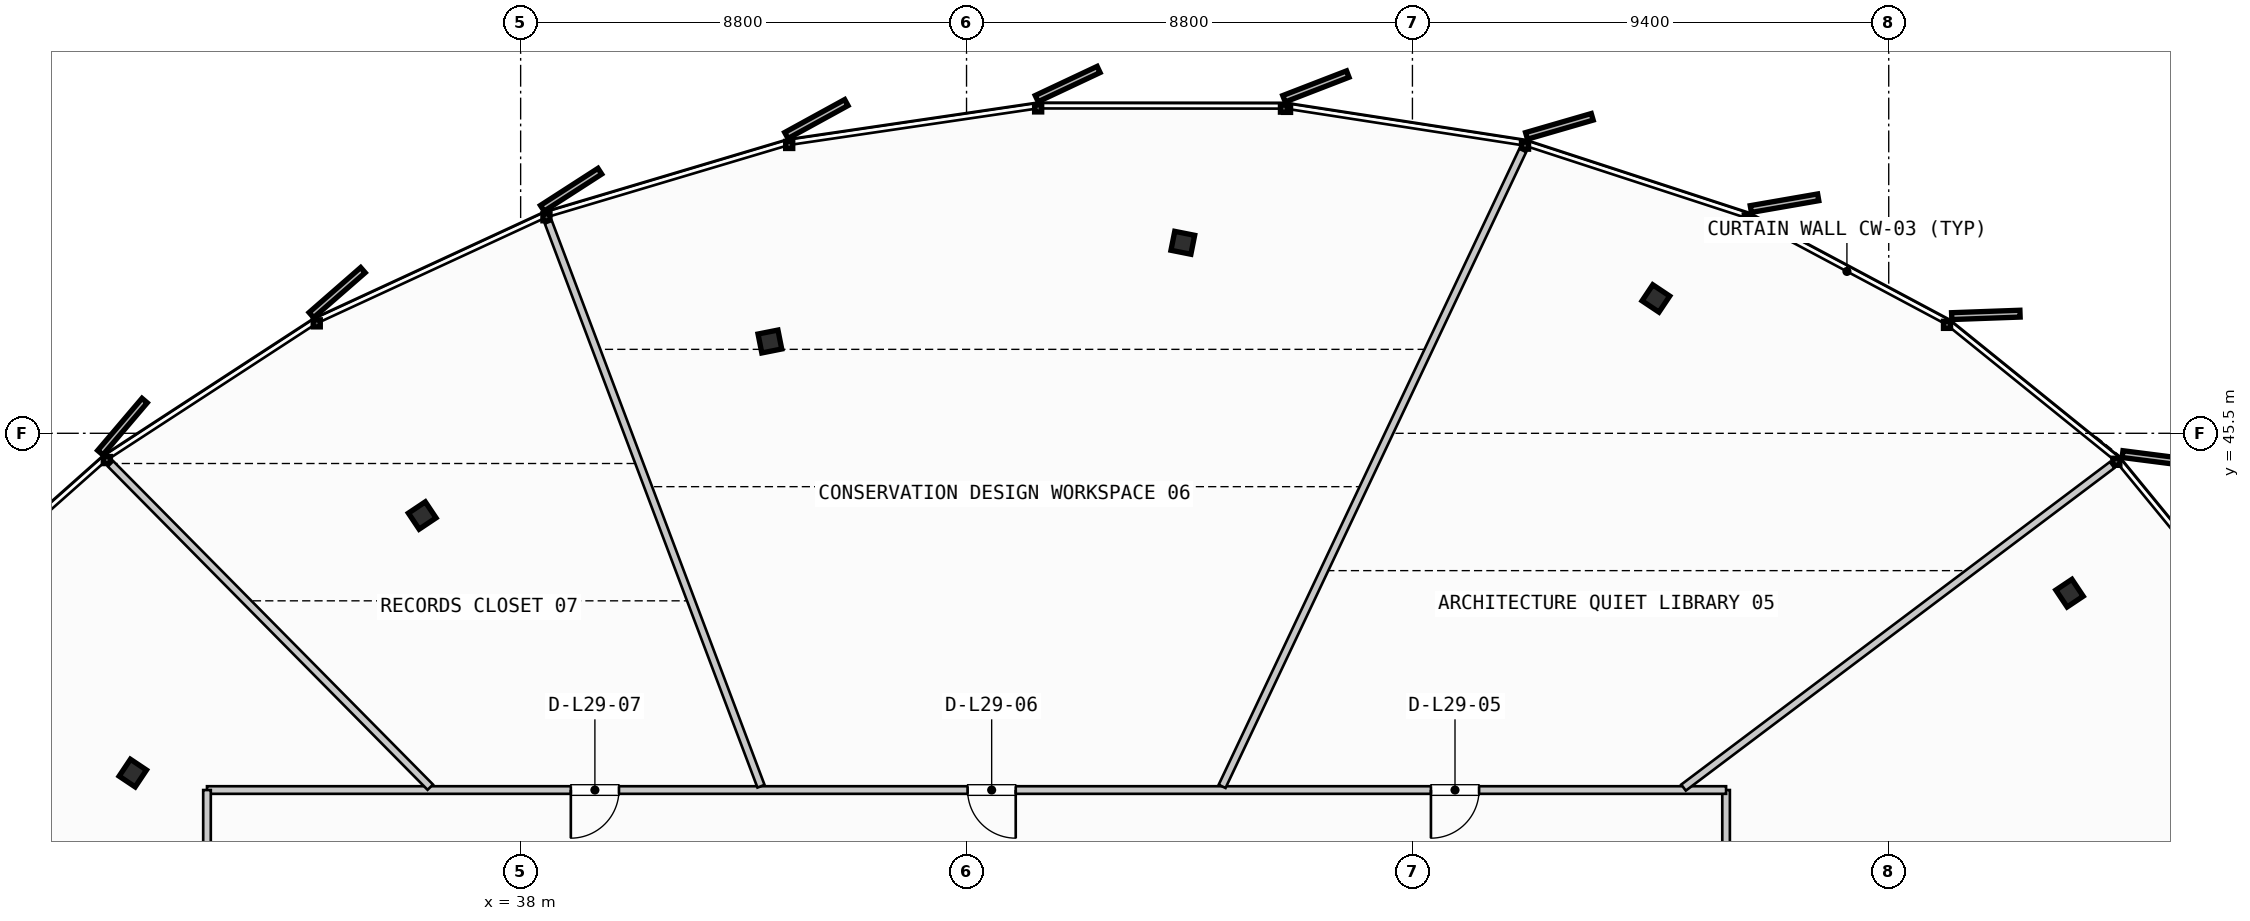
"""IFC4 building model, lengths in metres.
Left out: names, types, materials, properties, quantities, classifications, styles, units other than length and angle.
Written with IfcOpenShell. Run it as: python <this file> out.ifc"""

import sys

from ifc_helpers import new_model, si_unit, direction, frame, frame_2d, origin, origin_2d, place, context, subcontext, project, spatial, rectangle, i_section, extrude, source, transform, mapped, element, fill, save


model = new_model("IFC4")
c1 = context("Model", 3, precision=1e-05, world=origin(), true_north=direction((0.0, 1.0)))
c2 = subcontext(c1, "Body", "Model", "MODEL_VIEW")
j1 = project(units=[si_unit("LENGTHUNIT", "METRE"), si_unit("PLANEANGLEUNIT", "RADIAN")], contexts=[c1])
p1 = place(None, origin())
s1 = spatial("IfcSite", under=j1, at=p1, CompositionType="ELEMENT")
p2 = place(p1, origin())
s2 = spatial("IfcBuilding", under=s1, at=p2, CompositionType="ELEMENT")
p3 = place(p2, frame((0.0, 0.0, 118.0)))
s3 = spatial("IfcBuildingStorey", under=s2, at=p3, CompositionType="ELEMENT", Elevation=118.0)
m1 = source(origin(), c2, "Body", "SweptSolid", [
    extrude(i_section(OverallWidth=0.401, OverallDepth=0.381, WebThickness=0.032, FlangeThickness=0.051, FilletRadius=0.015, at=origin_2d()), origin(), (0.0, 0.0, 1.0), 3.35),
])
for number, where, z_axis, x_axis in (
    (1, (68.569, 42.345, 0.0), (0.0, 0.0, 1.0), (0.831, 0.556, 0.0)),
    (2, (60.405, 48.161, 0.0), (0.0, 0.0, 1.0), (0.556, 0.831, 0.0)),
    (3, (51.069, 49.259, 0.0), (0.0, 0.0, 1.0), (0.195, 0.981, 0.0)),
    (4, (42.919, 47.311, 0.0), (0.0, 0.0, 1.0), (-0.195, 0.981, 0.0)),
    (5, (36.058, 43.877, 0.0), (0.0, 0.0, 1.0), (-0.556, 0.831, 0.0)),
    (6, (30.346, 38.794, 0.0), (0.0, 0.0, 1.0), (-0.831, 0.556, 0.0)),
):
    element("IfcColumn", number, at=place(p3, frame(where, z_axis=z_axis, x_axis=x_axis)), inside=s3, PredefinedType="COLUMN", context=c2, shape_type="MappedRepresentation", body=[
        mapped(m1, transform((0.0, 0.0, 0.0), scale=1.0)),
    ])
p4 = place(p3, frame((61.79, 17.14, 0.0), z_axis=(0.0, 0.0, 1.0), x_axis=(0.0, 1.0, 0.0)))
e7 = element("IfcWall", 7, at=p4, inside=s3, PredefinedType="PARTITIONING", context=c2, shape_type="SweptSolid", body=[
    extrude(rectangle(XDim=21.32, YDim=0.15, at=frame_2d((10.66, 0.0))), origin(), (0.0, 0.0, 1.0), 2.775),
])
p5 = place(p4, frame((4.571, 0.0, 0.0)))
e8 = element("IfcOpeningElement", 8, at=p5, cuts=e7, PredefinedType="OPENING", context=c2, shape_type="SweptSolid", body=[
    extrude(rectangle(XDim=0.95, YDim=2.15, at=frame_2d((0.475, 1.075))), frame((0.0, 0.085, 0.0), z_axis=(0.0, -1.0, 0.0), x_axis=(1.0, 0.0, 0.0)), (0.0, 0.0, 1.0), 0.17),
])
p6 = place(p4, frame((14.65, 0.0, 0.0)))
e9 = element("IfcOpeningElement", 9, at=p6, cuts=e7, PredefinedType="OPENING", context=c2, shape_type="SweptSolid", body=[
    extrude(rectangle(XDim=0.95, YDim=2.15, at=frame_2d((0.475, 1.075))), frame((0.0, 0.085, 0.0), z_axis=(0.0, -1.0, 0.0), x_axis=(1.0, 0.0, 0.0)), (0.0, 0.0, 1.0), 0.17),
])
p7 = place(p3, frame((61.79, 38.46, 0.0), z_axis=(0.0, 0.0, 1.0), x_axis=(-1.0, 0.0, 0.0)))
e10 = element("IfcWall", 10, at=p7, inside=s3, PredefinedType="PARTITIONING", context=c2, shape_type="SweptSolid", body=[
    extrude(rectangle(XDim=29.98, YDim=0.15, at=frame_2d((14.99, 0.0))), origin(), (0.0, 0.0, 1.0), 2.775),
])
p8 = place(p7, frame((4.875, 0.0, 0.0)))
e11 = element("IfcOpeningElement", 11, at=p8, cuts=e10, PredefinedType="OPENING", context=c2, shape_type="SweptSolid", body=[
    extrude(rectangle(XDim=0.95, YDim=2.15, at=frame_2d((0.475, 1.075))), frame((0.0, 0.085, 0.0), z_axis=(0.0, -1.0, 0.0), x_axis=(1.0, 0.0, 0.0)), (0.0, 0.0, 1.0), 0.17),
])
p9 = place(p7, frame((14.019, 0.0, 0.0)))
e12 = element("IfcOpeningElement", 12, at=p9, cuts=e10, PredefinedType="OPENING", context=c2, shape_type="SweptSolid", body=[
    extrude(rectangle(XDim=0.95, YDim=2.15, at=frame_2d((0.475, 1.075))), frame((0.0, 0.085, 0.0), z_axis=(0.0, -1.0, 0.0), x_axis=(1.0, 0.0, 0.0)), (0.0, 0.0, 1.0), 0.17),
])
p10 = place(p7, frame((21.85, 0.0, 0.0)))
e13 = element("IfcOpeningElement", 13, at=p10, cuts=e10, PredefinedType="OPENING", context=c2, shape_type="SweptSolid", body=[
    extrude(rectangle(XDim=0.95, YDim=2.15, at=frame_2d((0.475, 1.075))), frame((0.0, 0.085, 0.0), z_axis=(0.0, -1.0, 0.0), x_axis=(1.0, 0.0, 0.0)), (0.0, 0.0, 1.0), 0.17),
])
p11 = place(p3, frame((31.81, 38.46, 0.0), z_axis=(0.0, 0.0, 1.0), x_axis=(0.0, -1.0, 0.0)))
e14 = element("IfcWall", 14, at=p11, inside=s3, PredefinedType="PARTITIONING", context=c2, shape_type="SweptSolid", body=[
    extrude(rectangle(XDim=21.32, YDim=0.15, at=frame_2d((10.66, 0.0))), origin(), (0.0, 0.0, 1.0), 2.775),
])
p12 = place(p11, frame((4.538, 0.0, 0.0)))
e15 = element("IfcOpeningElement", 15, at=p12, cuts=e14, PredefinedType="OPENING", context=c2, shape_type="SweptSolid", body=[
    extrude(rectangle(XDim=0.95, YDim=2.15, at=frame_2d((0.475, 1.075))), frame((0.0, 0.085, 0.0), z_axis=(0.0, -1.0, 0.0), x_axis=(1.0, 0.0, 0.0)), (0.0, 0.0, 1.0), 0.17),
])
p13 = place(p11, frame((14.618, 0.0, 0.0)))
e16 = element("IfcOpeningElement", 16, at=p13, cuts=e14, PredefinedType="OPENING", context=c2, shape_type="SweptSolid", body=[
    extrude(rectangle(XDim=0.95, YDim=2.15, at=frame_2d((0.475, 1.075))), frame((0.0, 0.085, 0.0), z_axis=(0.0, -1.0, 0.0), x_axis=(1.0, 0.0, 0.0)), (0.0, 0.0, 1.0), 0.17),
])
p14 = place(p3, frame((60.95, 38.508, 0.0), z_axis=(0.0, 0.0, 1.0), x_axis=(0.798949900746, 0.60139758571, 0.0)))
e17 = element("IfcWall", 17, at=p14, inside=s3, PredefinedType="PARTITIONING", context=c2, shape_type="SweptSolid", body=[
    extrude(rectangle(XDim=10.586, YDim=0.15, at=frame_2d((5.293, 0.0))), origin(), (0.0, 0.0, 1.0), 2.775),
])
p15 = place(p3, frame((51.844, 38.532, 0.0), z_axis=(0.0, 0.0, 1.0), x_axis=(0.427420913061, 0.904052743526, 0.0)))
e18 = element("IfcWall", 18, at=p15, inside=s3, PredefinedType="PARTITIONING", context=c2, shape_type="SweptSolid", body=[
    extrude(rectangle(XDim=13.881, YDim=0.15, at=frame_2d((6.94, 0.0))), origin(), (0.0, 0.0, 1.0), 2.775),
])
p16 = place(p3, frame((42.744, 38.535, 0.0), z_axis=(0.0, 0.0, 1.0), x_axis=(-0.352834531536, 0.935685734291, 0.0)))
e19 = element("IfcWall", 19, at=p16, inside=s3, PredefinedType="PARTITIONING", context=c2, shape_type="SweptSolid", body=[
    extrude(rectangle(XDim=11.895, YDim=0.15, at=frame_2d((5.948, 0.0))), origin(), (0.0, 0.0, 1.0), 2.775),
])
p17 = place(p3, frame((36.217, 38.517, 0.0), z_axis=(0.0, 0.0, 1.0), x_axis=(-0.703123175396, 0.711068070033, 0.0)))
e20 = element("IfcWall", 20, at=p17, inside=s3, PredefinedType="PARTITIONING", context=c2, shape_type="SweptSolid", body=[
    extrude(rectangle(XDim=8.973, YDim=0.15, at=frame_2d((4.486, 0.0))), origin(), (0.0, 0.0, 1.0), 2.775),
])
m2 = source(origin(), c2, "Body", "SweptSolid", [
    extrude(rectangle(XDim=0.95, YDim=2.15, at=frame_2d((0.475, 1.075))), frame((0.0, 0.025, 0.0), z_axis=(0.0, -1.0, 0.0), x_axis=(1.0, 0.0, 0.0)), (0.0, 0.0, 1.0), 0.05),
])
p18 = place(p8, origin())
e21 = element("IfcDoor", 21, at=p18, inside=s3, OperationType="SINGLE_SWING_RIGHT", PredefinedType="DOOR", context=c2, shape_type="MappedRepresentation", body=[
    mapped(m2, transform((0.0, 0.0, 0.0), scale=1.0)),
])
fill(e11, e21)
p19 = place(p9, origin())
e22 = element("IfcDoor", 22, at=p19, inside=s3, OperationType="SINGLE_SWING_LEFT", PredefinedType="DOOR", context=c2, shape_type="MappedRepresentation", body=[
    mapped(m2, transform((0.0, 0.0, 0.0), scale=1.0)),
])
fill(e12, e22)
p20 = place(p10, origin())
e23 = element("IfcDoor", 23, at=p20, inside=s3, OperationType="SINGLE_SWING_RIGHT", PredefinedType="DOOR", context=c2, shape_type="MappedRepresentation", body=[
    mapped(m2, transform((0.0, 0.0, 0.0), scale=1.0)),
])
fill(e13, e23)
save(model, sys.argv[1])
